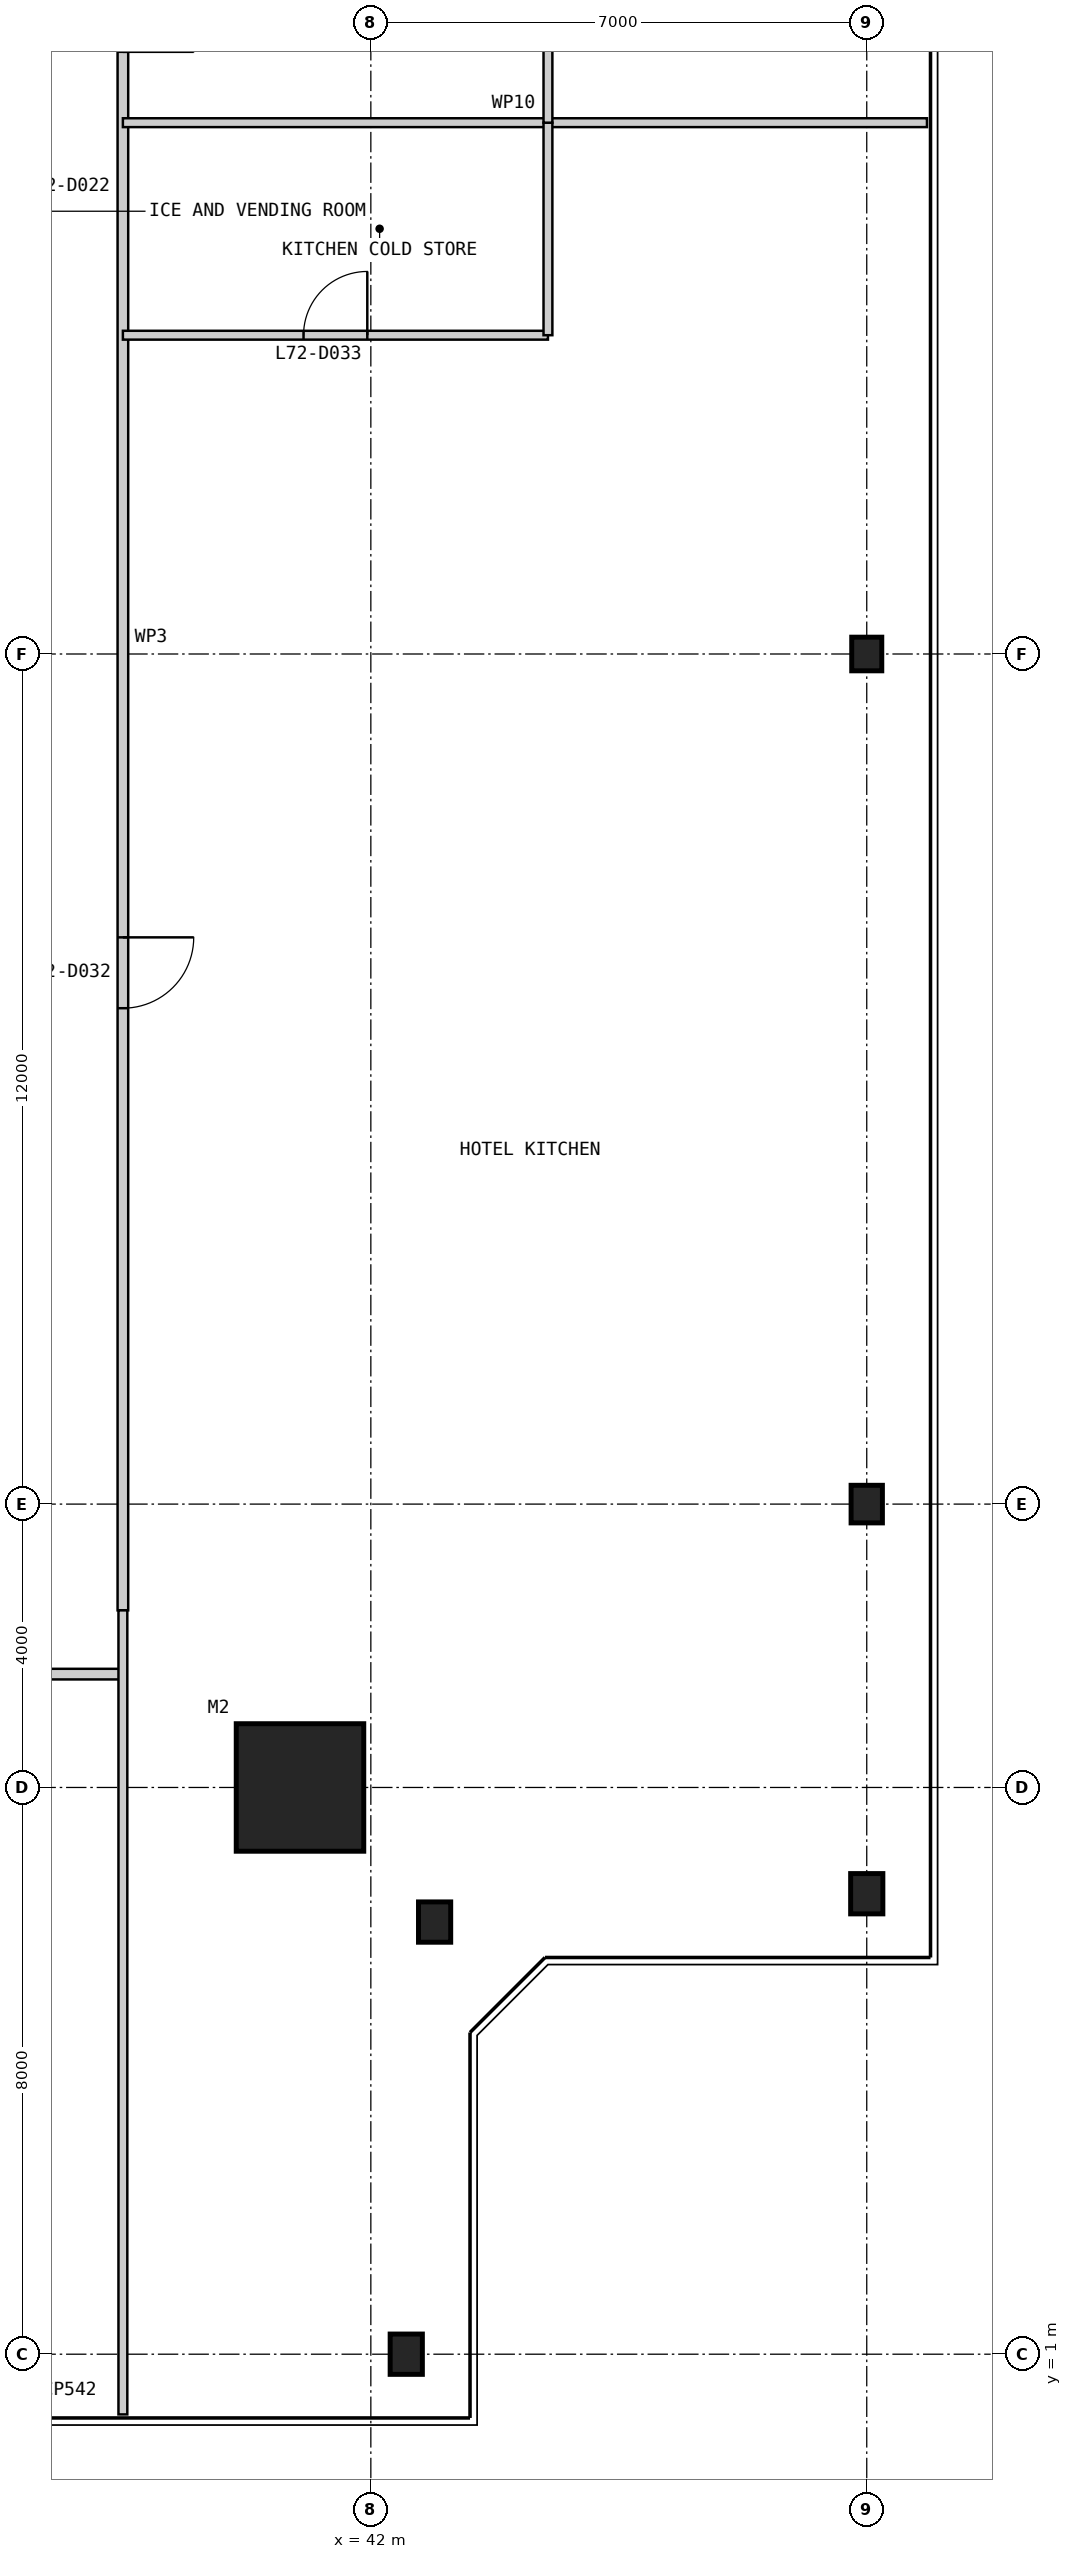
"""IFC4 building model, lengths in metres.
Left out: names, types, materials, properties, quantities, classifications, styles, units other than length and angle.
Written with IfcOpenShell. Run it as: python <this file> out.ifc"""

import sys

from ifc_helpers import new_model, si_unit, direction, frame, frame_2d, origin, origin_2d, place, context, subcontext, project, spatial, rectangle, i_section, extrude, element, fill, save


model = new_model("IFC4")
c1 = context("Model", 3, precision=1e-05, world=origin(), true_north=direction((0.0, 1.0)))
c2 = subcontext(c1, "Body", "Model", "MODEL_VIEW")
j1 = project(units=[si_unit("LENGTHUNIT", "METRE"), si_unit("PLANEANGLEUNIT", "RADIAN")], contexts=[c1])
p1 = place(None, origin())
s1 = spatial("IfcSite", under=j1, at=p1, CompositionType="ELEMENT")
p2 = place(p1, origin())
s2 = spatial("IfcBuilding", under=s1, at=p2, CompositionType="ELEMENT")
p3 = place(p2, frame((0.0, 0.0, 296.8)))
s3 = spatial("IfcBuildingStorey", under=s2, at=p3, CompositionType="ELEMENT", Elevation=296.8)
p4 = place(p3, frame((41.0, 9.0, 0.0), z_axis=(0.0, 0.0, 1.0), x_axis=(1.0, 0.0, 0.0)))
e1 = element("IfcColumn", 1, at=p4, inside=s3, PredefinedType="COLUMN", context=c2, shape_type="SweptSolid", body=[
    extrude(rectangle(XDim=1.8, YDim=1.8, at=origin_2d()), origin(), (0.0, 0.0, 1.0), 5.0),
])
for number, where, z_axis, x_axis in (
    (2, (42.5, 1.0, 0.0), (0.0, 0.0, 1.0), (1.0, 0.0, 0.0)),
    (3, (42.9, 7.1, 0.0), (0.0, 0.0, 1.0), (1.0, 0.0, 0.0)),
    (4, (49.0, 7.5, 0.0), (0.0, 0.0, 1.0), (1.0, 0.0, 0.0)),
):
    element("IfcColumn", number, at=place(p3, frame(where, z_axis=z_axis, x_axis=x_axis)), inside=s3, PredefinedType="COLUMN", context=c2, shape_type="SweptSolid", body=[
        extrude(i_section(OverallWidth=0.455, OverallDepth=0.569, WebThickness=0.078, FlangeThickness=0.125, at=origin_2d()), origin(), (0.0, 0.0, 1.0), 5.0),
    ])
p5 = place(p3, frame((49.0, 13.0, 0.0), z_axis=(0.0, 0.0, 1.0), x_axis=(1.0, 0.0, 0.0)))
e5 = element("IfcColumn", 5, at=p5, inside=s3, PredefinedType="COLUMN", context=c2, shape_type="SweptSolid", body=[
    extrude(i_section(OverallWidth=0.442, OverallDepth=0.531, WebThickness=0.066, FlangeThickness=0.106, at=origin_2d()), origin(), (0.0, 0.0, 1.0), 5.0),
])
p6 = place(p3, frame((49.0, 25.0, 0.0), z_axis=(0.0, 0.0, 1.0), x_axis=(1.0, 0.0, 0.0)))
e6 = element("IfcColumn", 6, at=p6, inside=s3, PredefinedType="COLUMN", context=c2, shape_type="SweptSolid", body=[
    extrude(i_section(OverallWidth=0.424, OverallDepth=0.475, WebThickness=0.048, FlangeThickness=0.077, at=origin_2d()), origin(), (0.0, 0.0, 1.0), 5.0),
])
p7 = place(p3, frame((11.5, 10.6, 0.0), z_axis=(0.0, 0.0, 1.0), x_axis=(1.0, 0.0, 0.0)))
e7 = element("IfcWall", 7, at=p7, inside=s3, PredefinedType="PARTITIONING", context=c2, shape_type="SweptSolid", body=[
    extrude(rectangle(XDim=27.0, YDim=0.15, at=frame_2d((13.5, 0.0))), origin(), (0.0, 0.0, 1.0), 4.8),
])
p8 = place(p7, frame((0.25, 0.0, 0.0)))
e8 = element("IfcOpeningElement", 8, at=p8, cuts=e7, PredefinedType="OPENING", context=c2, shape_type="SweptSolid", body=[
    extrude(rectangle(XDim=1.0, YDim=2.2, at=frame_2d((0.5, 1.1))), frame((0.0, 0.085, 0.0), z_axis=(0.0, -1.0, 0.0), x_axis=(1.0, 0.0, 0.0)), (0.0, 0.0, 1.0), 0.17),
])
p9 = place(p7, frame((10.75, 0.0, 0.0)))
e9 = element("IfcOpeningElement", 9, at=p9, cuts=e7, PredefinedType="OPENING", context=c2, shape_type="SweptSolid", body=[
    extrude(rectangle(XDim=1.0, YDim=2.2, at=frame_2d((0.5, 1.1))), frame((0.0, 0.085, 0.0), z_axis=(0.0, -1.0, 0.0), x_axis=(1.0, 0.0, 0.0)), (0.0, 0.0, 1.0), 0.17),
])
p10 = place(p7, frame((14.5, 0.0, 0.0)))
e10 = element("IfcOpeningElement", 10, at=p10, cuts=e7, PredefinedType="OPENING", context=c2, shape_type="SweptSolid", body=[
    extrude(rectangle(XDim=1.0, YDim=2.2, at=frame_2d((0.5, 1.1))), frame((0.0, 0.085, 0.0), z_axis=(0.0, -1.0, 0.0), x_axis=(1.0, 0.0, 0.0)), (0.0, 0.0, 1.0), 0.17),
])
p11 = place(p7, frame((23.5, 0.0, 0.0)))
e11 = element("IfcOpeningElement", 11, at=p11, cuts=e7, PredefinedType="OPENING", context=c2, shape_type="SweptSolid", body=[
    extrude(rectangle(XDim=1.0, YDim=2.2, at=frame_2d((0.5, 1.1))), frame((0.0, 0.085, 0.0), z_axis=(0.0, -1.0, 0.0), x_axis=(1.0, 0.0, 0.0)), (0.0, 0.0, 1.0), 0.17),
])
p12 = place(p3, frame((38.5, 11.5, 0.0), z_axis=(0.0, 0.0, 1.0), x_axis=(0.0, 1.0, 0.0)))
e12 = element("IfcWall", 12, at=p12, inside=s3, PredefinedType="PARTITIONING", context=c2, shape_type="SweptSolid", body=[
    extrude(rectangle(XDim=27.0, YDim=0.15, at=frame_2d((13.5, 0.0))), origin(), (0.0, 0.0, 1.0), 4.8),
])
p13 = place(p12, frame((8.5, 0.0, 0.0)))
e13 = element("IfcOpeningElement", 13, at=p13, cuts=e12, PredefinedType="OPENING", context=c2, shape_type="SweptSolid", body=[
    extrude(rectangle(XDim=1.0, YDim=2.2, at=frame_2d((0.5, 1.1))), frame((0.0, 0.085, 0.0), z_axis=(0.0, -1.0, 0.0), x_axis=(1.0, 0.0, 0.0)), (0.0, 0.0, 1.0), 0.17),
])
p14 = place(p12, frame((25.0, 0.0, 0.0)))
e14 = element("IfcOpeningElement", 14, at=p14, cuts=e12, PredefinedType="OPENING", context=c2, shape_type="SweptSolid", body=[
    extrude(rectangle(XDim=1.0, YDim=2.2, at=frame_2d((0.5, 1.1))), frame((0.0, 0.085, 0.0), z_axis=(0.0, -1.0, 0.0), x_axis=(1.0, 0.0, 0.0)), (0.0, 0.0, 1.0), 0.17),
])
p15 = place(p12, frame((22.0, 0.0, 0.0)))
e15 = element("IfcOpeningElement", 15, at=p15, cuts=e12, PredefinedType="OPENING", context=c2, shape_type="SweptSolid", body=[
    extrude(rectangle(XDim=1.0, YDim=2.2, at=frame_2d((0.5, 1.1))), frame((0.0, 0.085, 0.0), z_axis=(0.0, -1.0, 0.0), x_axis=(1.0, 0.0, 0.0)), (0.0, 0.0, 1.0), 0.17),
])
p16 = place(p3, frame((38.5, 0.15, 0.0), z_axis=(0.0, 0.0, 1.0), x_axis=(0.0, 1.0, 0.0)))
e16 = element("IfcWall", 16, at=p16, inside=s3, PredefinedType="PARTITIONING", context=c2, shape_type="SweptSolid", body=[
    extrude(rectangle(XDim=11.35, YDim=0.125, at=frame_2d((5.675, 0.0))), origin(), (0.0, 0.0, 1.0), 4.8),
])
p17 = place(p3, frame((44.5, 29.5, 0.0), z_axis=(0.0, 0.0, 1.0), x_axis=(-1.0, 0.0, 0.0)))
e17 = element("IfcWall", 17, at=p17, inside=s3, PredefinedType="PARTITIONING", context=c2, shape_type="SweptSolid", body=[
    extrude(rectangle(XDim=6.0, YDim=0.125, at=frame_2d((3.0, 0.0))), origin(), (0.0, 0.0, 1.0), 4.8),
])
p18 = place(p17, frame((2.55, 0.0, 0.0)))
e18 = element("IfcOpeningElement", 18, at=p18, cuts=e17, PredefinedType="OPENING", context=c2, shape_type="SweptSolid", body=[
    extrude(rectangle(XDim=0.9, YDim=2.2, at=frame_2d((0.45, 1.1))), frame((0.0, 0.073, 0.0), z_axis=(0.0, -1.0, 0.0), x_axis=(1.0, 0.0, 0.0)), (0.0, 0.0, 1.0), 0.145),
])
p19 = place(p3, frame((49.85, 32.5, 0.0), z_axis=(0.0, 0.0, 1.0), x_axis=(-1.0, 0.0, 0.0)))
e19 = element("IfcWall", 19, at=p19, inside=s3, PredefinedType="PARTITIONING", context=c2, shape_type="SweptSolid", body=[
    extrude(rectangle(XDim=11.35, YDim=0.125, at=frame_2d((5.675, 0.0))), origin(), (0.0, 0.0, 1.0), 4.8),
])
for number, where, z_axis, x_axis in (
    (20, (44.5, 29.5, 0.0), (0.0, 0.0, 1.0), (0.0, 1.0, 0.0)),
    (21, (44.5, 32.5, 0.0), (0.0, 0.0, 1.0), (0.0, 1.0, 0.0)),
):
    element("IfcWall", number, at=place(p3, frame(where, z_axis=z_axis, x_axis=x_axis)), inside=s3, PredefinedType="PARTITIONING", context=c2, shape_type="SweptSolid", body=[
        extrude(rectangle(XDim=3.0, YDim=0.125, at=frame_2d((1.5, 0.0))), origin(), (0.0, 0.0, 1.0), 4.8),
    ])
p20 = place(p13, frame((1.0, 0.0, 0.0), z_axis=(0.0, 0.0, 1.0), x_axis=(-1.0, 0.0, 0.0)))
e22 = element("IfcDoor", 22, at=p20, inside=s3, OperationType="SINGLE_SWING_LEFT", PredefinedType="DOOR", context=c2, shape_type="SweptSolid", body=[
    extrude(rectangle(XDim=1.0, YDim=2.2, at=frame_2d((0.5, 1.1))), frame((0.0, 0.025, 0.0), z_axis=(0.0, -1.0, 0.0), x_axis=(1.0, 0.0, 0.0)), (0.0, 0.0, 1.0), 0.05),
])
fill(e13, e22)
p21 = place(p18, frame((0.9, 0.0, 0.0), z_axis=(0.0, 0.0, 1.0), x_axis=(-1.0, 0.0, 0.0)))
e23 = element("IfcDoor", 23, at=p21, inside=s3, OperationType="SINGLE_SWING_RIGHT", PredefinedType="DOOR", context=c2, shape_type="SweptSolid", body=[
    extrude(rectangle(XDim=0.9, YDim=2.2, at=frame_2d((0.45, 1.1))), frame((0.0, 0.025, 0.0), z_axis=(0.0, -1.0, 0.0), x_axis=(1.0, 0.0, 0.0)), (0.0, 0.0, 1.0), 0.05),
])
fill(e18, e23)
save(model, sys.argv[1])
